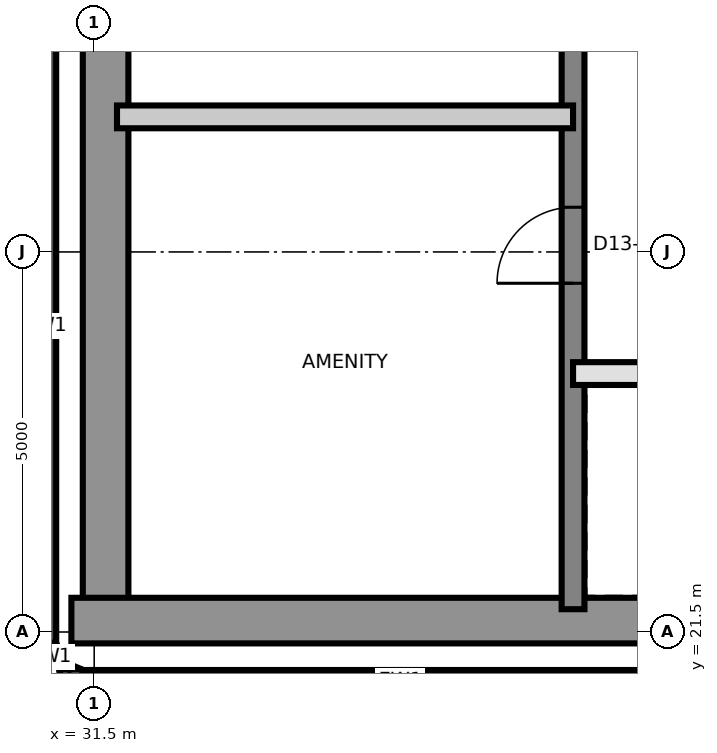
"""IFC4 building model, lengths in metres.
Left out: names, types, materials, properties, quantities, classifications, styles, units other than length and angle.
Written with IfcOpenShell. Run it as: python <this file> out.ifc"""

import sys

from ifc_helpers import new_model, si_unit, direction, frame, frame_2d, origin, place, context, subcontext, project, spatial, rectangle, extrude, element, fill, save


model = new_model("IFC4")
c1 = context("Model", 3, precision=1e-05, world=origin(), true_north=direction((0.0, 1.0)))
c2 = subcontext(c1, "Body", "Model", "MODEL_VIEW")
j1 = project(units=[si_unit("LENGTHUNIT", "METRE"), si_unit("PLANEANGLEUNIT", "RADIAN")], contexts=[c1])
p1 = place(None, origin())
s1 = spatial("IfcSite", under=j1, at=p1, CompositionType="ELEMENT")
p2 = place(p1, origin())
s2 = spatial("IfcBuilding", under=s1, at=p2, CompositionType="ELEMENT")
p3 = place(p2, frame((0.0, 0.0, 142.2)))
s3 = spatial("IfcBuildingStorey", under=s2, at=p3, CompositionType="ELEMENT", Elevation=142.2)
p4 = place(p3, frame((31.65, 21.8, 0.0), z_axis=(0.0, 0.0, 1.0), x_axis=(0.0, 1.0, 0.0)))
e1 = element("IfcWall", 1, at=p4, inside=s3, PredefinedType="SHEAR", context=c2, shape_type="SweptSolid", body=[
    extrude(rectangle(XDim=17.4, YDim=0.6, at=frame_2d((8.7, 0.0))), origin(), (0.0, 0.0, 1.0), 3.7),
])
p5 = place(p3, frame((31.2, 21.65, 0.0), z_axis=(0.0, 0.0, 1.0), x_axis=(1.0, 0.0, 0.0)))
e2 = element("IfcWall", 2, at=p5, inside=s3, PredefinedType="SHEAR", context=c2, shape_type="SweptSolid", body=[
    extrude(rectangle(XDim=27.0, YDim=0.6, at=frame_2d((13.5, 0.0))), origin(), (0.0, 0.0, 1.0), 3.7),
])
p6 = place(p3, frame((37.8, 21.8, 0.0), z_axis=(0.0, 0.0, 1.0), x_axis=(0.0, 1.0, 0.0)))
e3 = element("IfcWall", 3, at=p6, inside=s3, PredefinedType="SHEAR", context=c2, shape_type="SweptSolid", body=[
    extrude(rectangle(XDim=8.7, YDim=0.3, at=frame_2d((4.35, 0.0))), origin(), (0.0, 0.0, 1.0), 3.7),
])
p7 = place(p6, frame((4.288, 0.0, 0.0)))
e4 = element("IfcOpeningElement", 4, at=p7, cuts=e3, PredefinedType="OPENING", context=c2, shape_type="SweptSolid", body=[
    extrude(rectangle(XDim=1.0, YDim=2.1, at=frame_2d((0.5, 1.05))), frame((0.0, 0.16, 0.0), z_axis=(0.0, -1.0, 0.0), x_axis=(1.0, 0.0, 0.0)), (0.0, 0.0, 1.0), 0.32),
])
p8 = place(p3, frame((30.85, 29.699, 0.0), z_axis=(0.0, 0.0, 1.0), x_axis=(0.0, -1.0, 0.0)))
e5 = element("IfcWall", 5, at=p8, inside=s3, PredefinedType="SOLIDWALL", context=c2, shape_type="SweptSolid", body=[
    extrude(rectangle(XDim=8.34, YDim=0.3, at=frame_2d((4.17, 0.0))), origin(), (0.0, 0.0, 1.0), 3.4),
])
for number, where, z_axis, x_axis in (
    (6, (30.861, 21.302, 0.0), (0.0, 0.0, 1.0), (0.383, -0.924, 0.0)),
    (7, (31.048, 20.967, 0.0), (0.0, 0.0, 1.0), (0.924, -0.383, 0.0)),
):
    element("IfcWall", number, at=place(p3, frame(where, z_axis=z_axis, x_axis=x_axis)), inside=s3, PredefinedType="SOLIDWALL", context=c2, shape_type="SweptSolid", body=[
        extrude(rectangle(XDim=0.275, YDim=0.3, at=frame_2d((0.138, 0.0))), origin(), (0.0, 0.0, 1.0), 3.4),
    ])
p9 = place(p3, frame((31.36, 20.85, 0.0), z_axis=(0.0, 0.0, 1.0), x_axis=(1.0, 0.0, 0.0)))
e8 = element("IfcWall", 8, at=p9, inside=s3, PredefinedType="SOLIDWALL", context=c2, shape_type="SweptSolid", body=[
    extrude(rectangle(XDim=8.34, YDim=0.3, at=frame_2d((4.17, 0.0))), origin(), (0.0, 0.0, 1.0), 3.4),
])
p10 = place(p3, frame((37.8, 24.9, 0.0), z_axis=(0.0, 0.0, 1.0), x_axis=(1.0, 0.0, 0.0)))
e9 = element("IfcWall", 9, at=p10, inside=s3, PredefinedType="SOLIDWALL", context=c2, shape_type="SweptSolid", body=[
    extrude(rectangle(XDim=12.0, YDim=0.3, at=frame_2d((6.0, 0.0))), origin(), (0.0, 0.0, 1.0), 3.4),
])
p11 = place(p10, frame((1.05, 0.0, 0.0)))
e10 = element("IfcOpeningElement", 10, at=p11, cuts=e9, PredefinedType="OPENING", context=c2, shape_type="SweptSolid", body=[
    extrude(rectangle(XDim=0.9, YDim=2.1, at=frame_2d((0.45, 1.05))), frame((0.0, 0.16, 0.0), z_axis=(0.0, -1.0, 0.0), x_axis=(1.0, 0.0, 0.0)), (0.0, 0.0, 1.0), 0.32),
])
p12 = place(p10, frame((10.05, 0.0, 0.0)))
e11 = element("IfcOpeningElement", 11, at=p12, cuts=e9, PredefinedType="OPENING", context=c2, shape_type="SweptSolid", body=[
    extrude(rectangle(XDim=0.9, YDim=2.1, at=frame_2d((0.45, 1.05))), frame((0.0, 0.16, 0.0), z_axis=(0.0, -1.0, 0.0), x_axis=(1.0, 0.0, 0.0)), (0.0, 0.0, 1.0), 0.32),
])
p13 = place(p10, frame((3.95, 0.0, 0.0)))
e12 = element("IfcOpeningElement", 12, at=p13, cuts=e9, PredefinedType="OPENING", context=c2, shape_type="SweptSolid", body=[
    extrude(rectangle(XDim=1.1, YDim=2.4, at=frame_2d((0.55, 1.2))), frame((0.0, 0.16, 0.0), z_axis=(0.0, -1.0, 0.0), x_axis=(1.0, 0.0, 0.0)), (0.0, 0.0, 1.0), 0.32),
])
p14 = place(p10, frame((6.95, 0.0, 0.0)))
e13 = element("IfcOpeningElement", 13, at=p14, cuts=e9, PredefinedType="OPENING", context=c2, shape_type="SweptSolid", body=[
    extrude(rectangle(XDim=1.1, YDim=2.4, at=frame_2d((0.55, 1.2))), frame((0.0, 0.16, 0.0), z_axis=(0.0, -1.0, 0.0), x_axis=(1.0, 0.0, 0.0)), (0.0, 0.0, 1.0), 0.32),
])
p15 = place(p3, frame((31.8, 28.277, 0.0), z_axis=(0.0, 0.0, 1.0), x_axis=(1.0, 0.0, 0.0)))
e14 = element("IfcWall", 14, at=p15, inside=s3, PredefinedType="PARTITIONING", context=c2, shape_type="SweptSolid", body=[
    extrude(rectangle(XDim=6.0, YDim=0.3, at=frame_2d((3.0, 0.0))), origin(), (0.0, 0.0, 1.0), 3.4),
])
p16 = place(p7, origin())
e15 = element("IfcDoor", 15, at=p16, inside=s3, OperationType="SINGLE_SWING_RIGHT", PredefinedType="DOOR", context=c2, shape_type="SweptSolid", body=[
    extrude(rectangle(XDim=1.0, YDim=2.1, at=frame_2d((0.5, 1.05))), frame((0.0, 0.025, 0.0), z_axis=(0.0, -1.0, 0.0), x_axis=(1.0, 0.0, 0.0)), (0.0, 0.0, 1.0), 0.05),
])
fill(e4, e15)
save(model, sys.argv[1])
